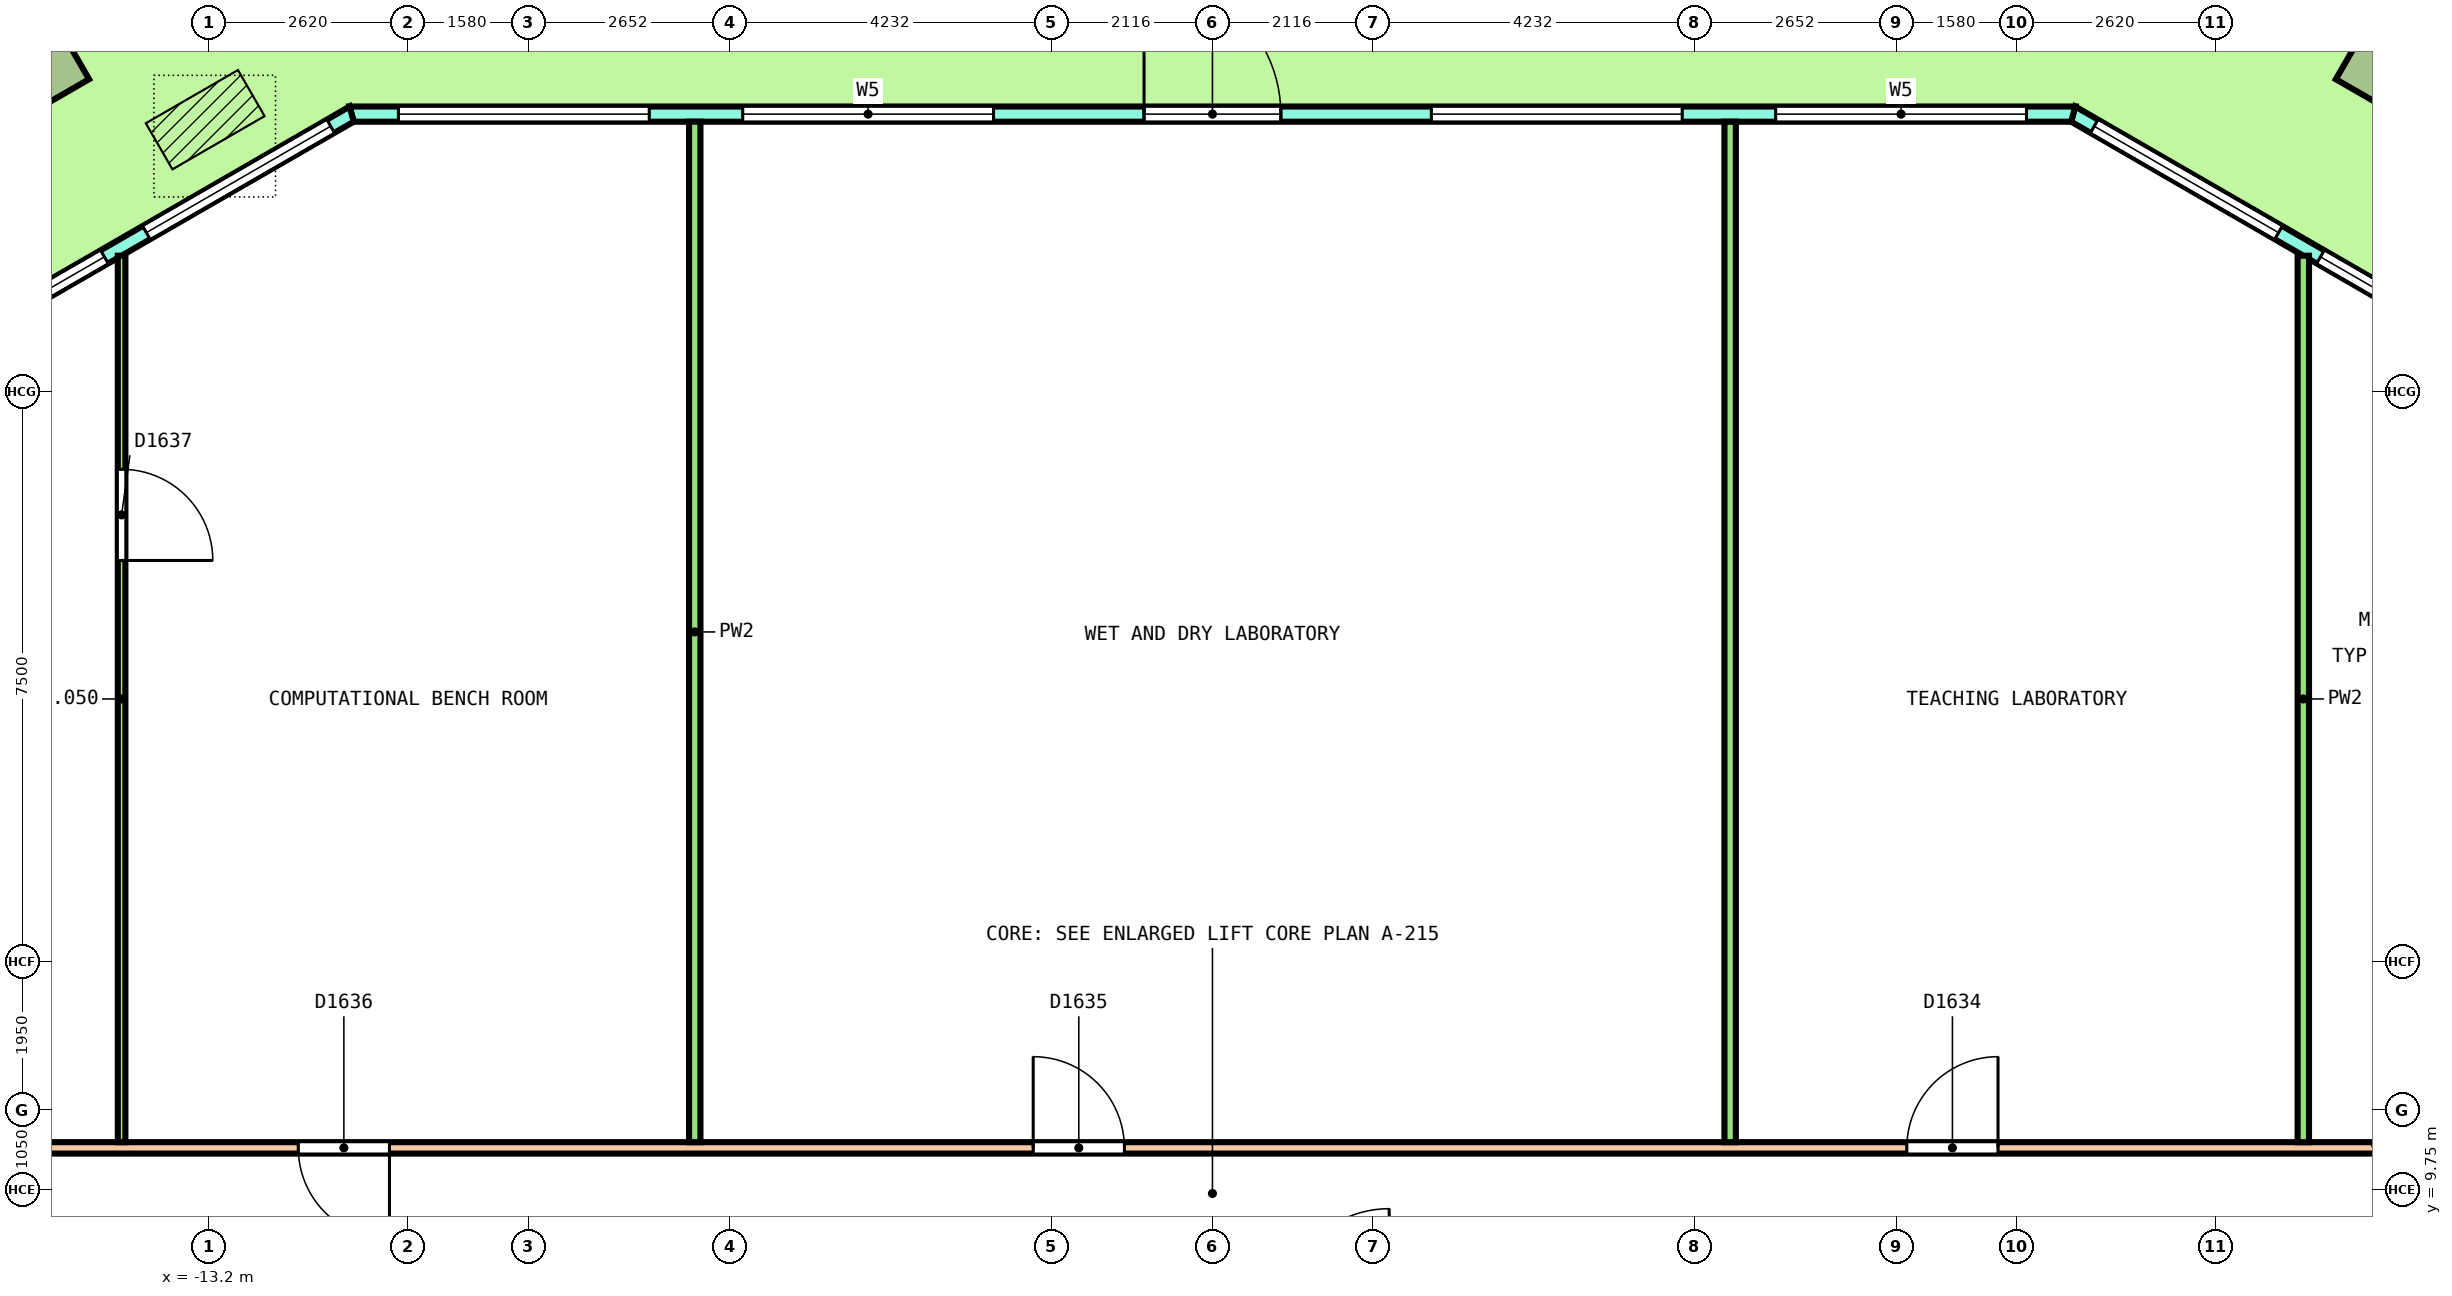
"""IFC4 building model, lengths in metres.
Left out: names, types, materials, properties, quantities, classifications, styles, units other than length and angle.
Written with IfcOpenShell. Run it as: python <this file> out.ifc"""

import sys

from ifc_helpers import new_model, si_unit, direction, frame, frame_2d, origin, origin_2d, place, context, subcontext, project, spatial, polyline, rectangle, outline, extrude, element, fill, save


model = new_model("IFC4")
c1 = context("Model", 3, precision=1e-05, world=origin(), true_north=direction((0.0, 1.0)))
c2 = subcontext(c1, "Body", "Model", "MODEL_VIEW")
j1 = project(units=[si_unit("LENGTHUNIT", "METRE"), si_unit("PLANEANGLEUNIT", "RADIAN")], contexts=[c1])
p1 = place(None, origin())
s1 = spatial("IfcSite", under=j1, at=p1, CompositionType="ELEMENT")
p2 = place(p1, origin())
s2 = spatial("IfcBuilding", under=s1, at=p2, CompositionType="ELEMENT")
p3 = place(p2, frame((0.0, 0.0, 122.0)))
s3 = spatial("IfcBuildingStorey", under=s2, at=p3, CompositionType="ELEMENT", Elevation=122.0)
for number, where, z_axis, x_axis in (
    (1, (15.701, 24.606, 0.0), (0.023, 0.0, 1.0), (-0.866, 0.5, 0.02)),
    (2, (-15.701, 24.606, 0.0), (-0.023, 0.0, 1.0), (-0.866, -0.5, -0.02)),
):
    element("IfcColumn", number, at=place(p3, frame(where, z_axis=z_axis, x_axis=x_axis)), inside=s3, PredefinedType="COLUMN", context=c2, shape_type="SweptSolid", body=[
        extrude(rectangle(XDim=1.35, YDim=1.35, at=origin_2d()), origin(), (0.0, 0.0, 1.0), 4.051),
    ])
p4 = place(p3, frame((17.278, 20.463, 0.0), z_axis=(0.0, 0.0, 1.0), x_axis=(-0.866029458321, 0.49999297727, 0.0)))
e3 = element("IfcWall", 3, at=p4, inside=s3, PredefinedType="SOLIDWALL", context=c2, shape_type="SweptSolid", body=[
    extrude(outline(polyline([(-0.027, -0.1), (1.128, -0.1), (2.282, -0.1), (3.437, -0.1), (4.592, -0.1), (5.747, -0.1), (6.901, -0.1), (6.848, 0.1), (5.711, 0.1), (4.574, 0.1), (3.437, 0.1), (2.301, 0.1), (1.164, 0.1), (0.027, 0.1), (-0.027, -0.1)])), origin(), (0.0, 0.0, 1.0), 4.1),
])
p5 = place(p4, frame((0.319, 0.0, 0.1)))
e4 = element("IfcOpeningElement", 4, at=p5, cuts=e3, PredefinedType="OPENING", context=c2, shape_type="SweptSolid", body=[
    extrude(rectangle(XDim=2.8, YDim=2.9, at=frame_2d((1.4, 1.45))), frame((0.0, 0.11, 0.0), z_axis=(0.0, -1.0, 0.0), x_axis=(1.0, 0.0, 0.0)), (0.0, 0.0, 1.0), 0.22),
])
p6 = place(p4, frame((3.756, 0.0, 0.1)))
e5 = element("IfcOpeningElement", 5, at=p6, cuts=e3, PredefinedType="OPENING", context=c2, shape_type="SweptSolid", body=[
    extrude(rectangle(XDim=2.8, YDim=2.9, at=frame_2d((1.4, 1.45))), frame((0.0, 0.11, 0.0), z_axis=(0.0, -1.0, 0.0), x_axis=(1.0, 0.0, 0.0)), (0.0, 0.0, 1.0), 0.22),
])
p7 = place(p3, frame((11.325, 23.9, 0.0), z_axis=(0.0, 0.0, 1.0), x_axis=(-1.0, 0.0, 0.0)))
e6 = element("IfcWall", 6, at=p7, inside=s3, PredefinedType="SOLIDWALL", context=c2, shape_type="SweptSolid", body=[
    extrude(outline(polyline([(-0.027, -0.1), (1.005, -0.1), (2.037, -0.1), (3.069, -0.1), (4.101, -0.1), (5.133, -0.1), (6.165, -0.1), (7.197, -0.1), (8.229, -0.1), (9.261, -0.1), (10.293, -0.1), (11.325, -0.1), (12.357, -0.1), (13.389, -0.1), (14.421, -0.1), (15.453, -0.1), (16.485, -0.1), (17.516, -0.1), (18.548, -0.1), (19.58, -0.1), (20.612, -0.1), (21.644, -0.1), (22.676, -0.1), (22.623, 0.1), (21.595, 0.1), (20.568, 0.1), (19.541, 0.1), (18.514, 0.1), (17.487, 0.1), (16.46, 0.1), (15.433, 0.1), (14.406, 0.1), (13.379, 0.1), (12.352, 0.1), (11.325, 0.1), (10.298, 0.1), (9.271, 0.1), (8.243, 0.1), (7.216, 0.1), (6.189, 0.1), (5.162, 0.1), (4.135, 0.1), (3.108, 0.1), (2.081, 0.1), (1.054, 0.1), (0.027, 0.1), (-0.027, -0.1)])), origin(), (0.0, 0.0, 1.0), 4.1),
])
p8 = place(p7, frame((0.615, 0.0, 0.1)))
e7 = element("IfcOpeningElement", 7, at=p8, cuts=e6, PredefinedType="OPENING", context=c2, shape_type="SweptSolid", body=[
    extrude(rectangle(XDim=3.3, YDim=2.9, at=frame_2d((1.65, 1.45))), frame((0.0, 0.11, 0.0), z_axis=(0.0, -1.0, 0.0), x_axis=(1.0, 0.0, 0.0)), (0.0, 0.0, 1.0), 0.22),
])
p9 = place(p7, frame((5.145, 0.0, 0.1)))
e8 = element("IfcOpeningElement", 8, at=p9, cuts=e6, PredefinedType="OPENING", context=c2, shape_type="SweptSolid", body=[
    extrude(rectangle(XDim=3.3, YDim=2.9, at=frame_2d((1.65, 1.45))), frame((0.0, 0.11, 0.0), z_axis=(0.0, -1.0, 0.0), x_axis=(1.0, 0.0, 0.0)), (0.0, 0.0, 1.0), 0.22),
])
p10 = place(p7, frame((10.425, 0.0, 0.0)))
e9 = element("IfcOpeningElement", 9, at=p10, cuts=e6, PredefinedType="OPENING", context=c2, shape_type="SweptSolid", body=[
    extrude(rectangle(XDim=1.8, YDim=2.4, at=frame_2d((0.9, 1.2))), frame((0.0, 0.11, 0.0), z_axis=(0.0, -1.0, 0.0), x_axis=(1.0, 0.0, 0.0)), (0.0, 0.0, 1.0), 0.22),
])
p11 = place(p7, frame((10.425, 0.0, 2.55)))
e10 = element("IfcOpeningElement", 10, at=p11, cuts=e6, PredefinedType="OPENING", context=c2, shape_type="SweptSolid", body=[
    extrude(rectangle(XDim=1.8, YDim=0.45, at=frame_2d((0.9, 0.225))), frame((0.0, 0.11, 0.0), z_axis=(0.0, -1.0, 0.0), x_axis=(1.0, 0.0, 0.0)), (0.0, 0.0, 1.0), 0.22),
])
p12 = place(p7, frame((14.205, 0.0, 0.1)))
e11 = element("IfcOpeningElement", 11, at=p12, cuts=e6, PredefinedType="OPENING", context=c2, shape_type="SweptSolid", body=[
    extrude(rectangle(XDim=3.3, YDim=2.9, at=frame_2d((1.65, 1.45))), frame((0.0, 0.11, 0.0), z_axis=(0.0, -1.0, 0.0), x_axis=(1.0, 0.0, 0.0)), (0.0, 0.0, 1.0), 0.22),
])
p13 = place(p7, frame((18.734, 0.0, 0.1)))
e12 = element("IfcOpeningElement", 12, at=p13, cuts=e6, PredefinedType="OPENING", context=c2, shape_type="SweptSolid", body=[
    extrude(rectangle(XDim=3.3, YDim=2.9, at=frame_2d((1.65, 1.45))), frame((0.0, 0.11, 0.0), z_axis=(0.0, -1.0, 0.0), x_axis=(1.0, 0.0, 0.0)), (0.0, 0.0, 1.0), 0.22),
])
p14 = place(p3, frame((-11.325, 23.9, 0.0), z_axis=(0.0, 0.0, 1.0), x_axis=(-0.866029458321, -0.49999297727, 0.0)))
e13 = element("IfcWall", 13, at=p14, inside=s3, PredefinedType="SOLIDWALL", context=c2, shape_type="SweptSolid", body=[
    extrude(outline(polyline([(-0.027, -0.1), (1.128, -0.1), (2.282, -0.1), (3.437, -0.1), (4.592, -0.1), (5.747, -0.1), (6.901, -0.1), (6.848, 0.1), (5.711, 0.1), (4.574, 0.1), (3.437, 0.1), (2.301, 0.1), (1.164, 0.1), (0.027, 0.1), (-0.027, -0.1)])), origin(), (0.0, 0.0, 1.0), 4.1),
])
p15 = place(p14, frame((0.319, 0.0, 0.1)))
e14 = element("IfcOpeningElement", 14, at=p15, cuts=e13, PredefinedType="OPENING", context=c2, shape_type="SweptSolid", body=[
    extrude(rectangle(XDim=2.8, YDim=2.9, at=frame_2d((1.4, 1.45))), frame((0.0, 0.11, 0.0), z_axis=(0.0, -1.0, 0.0), x_axis=(1.0, 0.0, 0.0)), (0.0, 0.0, 1.0), 0.22),
])
p16 = place(p14, frame((3.756, 0.0, 0.1)))
e15 = element("IfcOpeningElement", 15, at=p16, cuts=e13, PredefinedType="OPENING", context=c2, shape_type="SweptSolid", body=[
    extrude(rectangle(XDim=2.8, YDim=2.9, at=frame_2d((1.4, 1.45))), frame((0.0, 0.11, 0.0), z_axis=(0.0, -1.0, 0.0), x_axis=(1.0, 0.0, 0.0)), (0.0, 0.0, 1.0), 0.22),
])
p17 = place(p3, frame((-15.325, 10.3, 0.0), z_axis=(0.0, 0.0, 1.0), x_axis=(1.0, 0.0, 0.0)))
e16 = element("IfcWall", 16, at=p17, inside=s3, PredefinedType="PARTITIONING", context=c2, shape_type="SweptSolid", body=[
    extrude(rectangle(XDim=30.65, YDim=0.15, at=frame_2d((15.325, 0.0))), origin(), (0.0, 0.0, 1.0), 3.05),
])
p18 = place(p17, frame((24.46, 0.0, 0.0)))
e17 = element("IfcOpeningElement", 17, at=p18, cuts=e16, PredefinedType="OPENING", context=c2, shape_type="SweptSolid", body=[
    extrude(rectangle(XDim=1.2, YDim=2.1, at=frame_2d((0.6, 1.05))), frame((0.0, 0.085, 0.0), z_axis=(0.0, -1.0, 0.0), x_axis=(1.0, 0.0, 0.0)), (0.0, 0.0, 1.0), 0.17),
])
p19 = place(p17, frame((12.967, 0.0, 0.0)))
e18 = element("IfcOpeningElement", 18, at=p19, cuts=e16, PredefinedType="OPENING", context=c2, shape_type="SweptSolid", body=[
    extrude(rectangle(XDim=1.2, YDim=2.1, at=frame_2d((0.6, 1.05))), frame((0.0, 0.085, 0.0), z_axis=(0.0, -1.0, 0.0), x_axis=(1.0, 0.0, 0.0)), (0.0, 0.0, 1.0), 0.17),
])
p20 = place(p17, frame((3.298, 0.0, 0.0)))
e19 = element("IfcOpeningElement", 19, at=p20, cuts=e16, PredefinedType="OPENING", context=c2, shape_type="SweptSolid", body=[
    extrude(rectangle(XDim=1.2, YDim=2.1, at=frame_2d((0.6, 1.05))), frame((0.0, 0.085, 0.0), z_axis=(0.0, -1.0, 0.0), x_axis=(1.0, 0.0, 0.0)), (0.0, 0.0, 1.0), 0.17),
])
p21 = place(p3, frame((14.352, 10.375, 0.0), z_axis=(0.0, 0.0, 1.0), x_axis=(0.0, 1.0, 0.0)))
e20 = element("IfcWall", 20, at=p21, inside=s3, PredefinedType="PARTITIONING", context=c2, shape_type="SweptSolid", body=[
    extrude(rectangle(XDim=11.662, YDim=0.15, at=frame_2d((5.831, 0.0))), origin(), (0.0, 0.0, 1.0), 3.05),
])
for number, where, z_axis, x_axis in (
    (21, (6.811, 10.375, 0.0), (0.0, 0.0, 1.0), (0.0, 1.0, 0.0)),
    (22, (-6.811, 10.375, 0.0), (0.0, 0.0, 1.0), (0.0, 1.0, 0.0)),
):
    element("IfcWall", number, at=place(p3, frame(where, z_axis=z_axis, x_axis=x_axis)), inside=s3, PredefinedType="PARTITIONING", context=c2, shape_type="SweptSolid", body=[
        extrude(rectangle(XDim=13.425, YDim=0.15, at=frame_2d((6.712, 0.0))), origin(), (0.0, 0.0, 1.0), 3.05),
    ])
p22 = place(p3, frame((-14.352, 10.375, 0.0), z_axis=(0.0, 0.0, 1.0), x_axis=(0.0, 1.0, 0.0)))
e23 = element("IfcWall", 23, at=p22, inside=s3, PredefinedType="PARTITIONING", context=c2, shape_type="SweptSolid", body=[
    extrude(rectangle(XDim=11.662, YDim=0.1, at=frame_2d((5.831, 0.0))), origin(), (0.0, 0.0, 1.0), 3.05),
])
p23 = place(p22, frame((7.653, 0.0, 0.0)))
e24 = element("IfcOpeningElement", 24, at=p23, cuts=e23, PredefinedType="OPENING", context=c2, shape_type="SweptSolid", body=[
    extrude(rectangle(XDim=1.2, YDim=2.1, at=frame_2d((0.6, 1.05))), frame((0.0, 0.06, 0.0), z_axis=(0.0, -1.0, 0.0), x_axis=(1.0, 0.0, 0.0)), (0.0, 0.0, 1.0), 0.12),
])
p24 = place(p5, origin())
e25 = element("IfcWindow", 25, at=p24, inside=s3, PartitioningType="SINGLE_PANEL", PredefinedType="WINDOW", context=c2, shape_type="SweptSolid", body=[
    extrude(rectangle(XDim=2.8, YDim=2.9, at=frame_2d((1.4, 1.45))), frame((0.0, 0.03, 0.0), z_axis=(0.0, -1.0, 0.0), x_axis=(1.0, 0.0, 0.0)), (0.0, 0.0, 1.0), 0.06),
])
fill(e4, e25)
p25 = place(p6, origin())
e26 = element("IfcWindow", 26, at=p25, inside=s3, PartitioningType="SINGLE_PANEL", PredefinedType="WINDOW", context=c2, shape_type="SweptSolid", body=[
    extrude(rectangle(XDim=2.8, YDim=2.9, at=frame_2d((1.4, 1.45))), frame((0.0, 0.03, 0.0), z_axis=(0.0, -1.0, 0.0), x_axis=(1.0, 0.0, 0.0)), (0.0, 0.0, 1.0), 0.06),
])
fill(e5, e26)
p26 = place(p8, origin())
e27 = element("IfcWindow", 27, at=p26, inside=s3, PartitioningType="SINGLE_PANEL", PredefinedType="WINDOW", context=c2, shape_type="SweptSolid", body=[
    extrude(rectangle(XDim=3.3, YDim=2.9, at=frame_2d((1.65, 1.45))), frame((0.0, 0.03, 0.0), z_axis=(0.0, -1.0, 0.0), x_axis=(1.0, 0.0, 0.0)), (0.0, 0.0, 1.0), 0.06),
])
fill(e7, e27)
p27 = place(p9, origin())
e28 = element("IfcWindow", 28, at=p27, inside=s3, PartitioningType="SINGLE_PANEL", PredefinedType="WINDOW", context=c2, shape_type="SweptSolid", body=[
    extrude(rectangle(XDim=3.3, YDim=2.9, at=frame_2d((1.65, 1.45))), frame((0.0, 0.03, 0.0), z_axis=(0.0, -1.0, 0.0), x_axis=(1.0, 0.0, 0.0)), (0.0, 0.0, 1.0), 0.06),
])
fill(e8, e28)
p28 = place(p10, origin())
e29 = element("IfcDoor", 29, at=p28, inside=s3, OperationType="DOUBLE_DOOR_SINGLE_SWING", PredefinedType="DOOR", context=c2, shape_type="SweptSolid", body=[
    extrude(rectangle(XDim=1.8, YDim=2.4, at=frame_2d((0.9, 1.2))), frame((0.0, 0.025, 0.0), z_axis=(0.0, -1.0, 0.0), x_axis=(1.0, 0.0, 0.0)), (0.0, 0.0, 1.0), 0.05),
])
fill(e9, e29)
p29 = place(p11, origin())
e30 = element("IfcWindow", 30, at=p29, inside=s3, PartitioningType="SINGLE_PANEL", PredefinedType="WINDOW", context=c2, shape_type="SweptSolid", body=[
    extrude(rectangle(XDim=1.8, YDim=0.45, at=frame_2d((0.9, 0.225))), frame((0.0, 0.03, 0.0), z_axis=(0.0, -1.0, 0.0), x_axis=(1.0, 0.0, 0.0)), (0.0, 0.0, 1.0), 0.06),
])
fill(e10, e30)
p30 = place(p12, origin())
e31 = element("IfcWindow", 31, at=p30, inside=s3, PartitioningType="SINGLE_PANEL", PredefinedType="WINDOW", context=c2, shape_type="SweptSolid", body=[
    extrude(rectangle(XDim=3.3, YDim=2.9, at=frame_2d((1.65, 1.45))), frame((0.0, 0.03, 0.0), z_axis=(0.0, -1.0, 0.0), x_axis=(1.0, 0.0, 0.0)), (0.0, 0.0, 1.0), 0.06),
])
fill(e11, e31)
p31 = place(p13, origin())
e32 = element("IfcWindow", 32, at=p31, inside=s3, PartitioningType="SINGLE_PANEL", PredefinedType="WINDOW", context=c2, shape_type="SweptSolid", body=[
    extrude(rectangle(XDim=3.3, YDim=2.9, at=frame_2d((1.65, 1.45))), frame((0.0, 0.03, 0.0), z_axis=(0.0, -1.0, 0.0), x_axis=(1.0, 0.0, 0.0)), (0.0, 0.0, 1.0), 0.06),
])
fill(e12, e32)
p32 = place(p15, origin())
e33 = element("IfcWindow", 33, at=p32, inside=s3, PartitioningType="SINGLE_PANEL", PredefinedType="WINDOW", context=c2, shape_type="SweptSolid", body=[
    extrude(rectangle(XDim=2.8, YDim=2.9, at=frame_2d((1.4, 1.45))), frame((0.0, 0.03, 0.0), z_axis=(0.0, -1.0, 0.0), x_axis=(1.0, 0.0, 0.0)), (0.0, 0.0, 1.0), 0.06),
])
fill(e14, e33)
p33 = place(p16, origin())
e34 = element("IfcWindow", 34, at=p33, inside=s3, PartitioningType="SINGLE_PANEL", PredefinedType="WINDOW", context=c2, shape_type="SweptSolid", body=[
    extrude(rectangle(XDim=2.8, YDim=2.9, at=frame_2d((1.4, 1.45))), frame((0.0, 0.03, 0.0), z_axis=(0.0, -1.0, 0.0), x_axis=(1.0, 0.0, 0.0)), (0.0, 0.0, 1.0), 0.06),
])
fill(e15, e34)
p34 = place(p18, origin())
e35 = element("IfcDoor", 35, at=p34, inside=s3, OperationType="DOUBLE_DOOR_SINGLE_SWING", PredefinedType="DOOR", context=c2, shape_type="SweptSolid", body=[
    extrude(rectangle(XDim=1.2, YDim=2.1, at=frame_2d((0.6, 1.05))), frame((0.0, 0.025, 0.0), z_axis=(0.0, -1.0, 0.0), x_axis=(1.0, 0.0, 0.0)), (0.0, 0.0, 1.0), 0.05),
])
fill(e17, e35)
p35 = place(p19, origin())
e36 = element("IfcDoor", 36, at=p35, inside=s3, OperationType="DOUBLE_DOOR_SINGLE_SWING", PredefinedType="DOOR", context=c2, shape_type="SweptSolid", body=[
    extrude(rectangle(XDim=1.2, YDim=2.1, at=frame_2d((0.6, 1.05))), frame((0.0, 0.025, 0.0), z_axis=(0.0, -1.0, 0.0), x_axis=(1.0, 0.0, 0.0)), (0.0, 0.0, 1.0), 0.05),
])
fill(e18, e36)
p36 = place(p20, origin())
e37 = element("IfcDoor", 37, at=p36, inside=s3, OperationType="DOUBLE_DOOR_SINGLE_SWING", PredefinedType="DOOR", context=c2, shape_type="SweptSolid", body=[
    extrude(rectangle(XDim=1.2, YDim=2.1, at=frame_2d((0.6, 1.05))), frame((0.0, 0.025, 0.0), z_axis=(0.0, -1.0, 0.0), x_axis=(1.0, 0.0, 0.0)), (0.0, 0.0, 1.0), 0.05),
])
fill(e19, e37)
p37 = place(p23, origin())
e38 = element("IfcDoor", 38, at=p37, inside=s3, OperationType="DOUBLE_DOOR_SINGLE_SWING", PredefinedType="DOOR", context=c2, shape_type="SweptSolid", body=[
    extrude(rectangle(XDim=1.2, YDim=2.1, at=frame_2d((0.6, 1.05))), frame((0.0, 0.025, 0.0), z_axis=(0.0, -1.0, 0.0), x_axis=(1.0, 0.0, 0.0)), (0.0, 0.0, 1.0), 0.05),
])
fill(e24, e38)
save(model, sys.argv[1])
